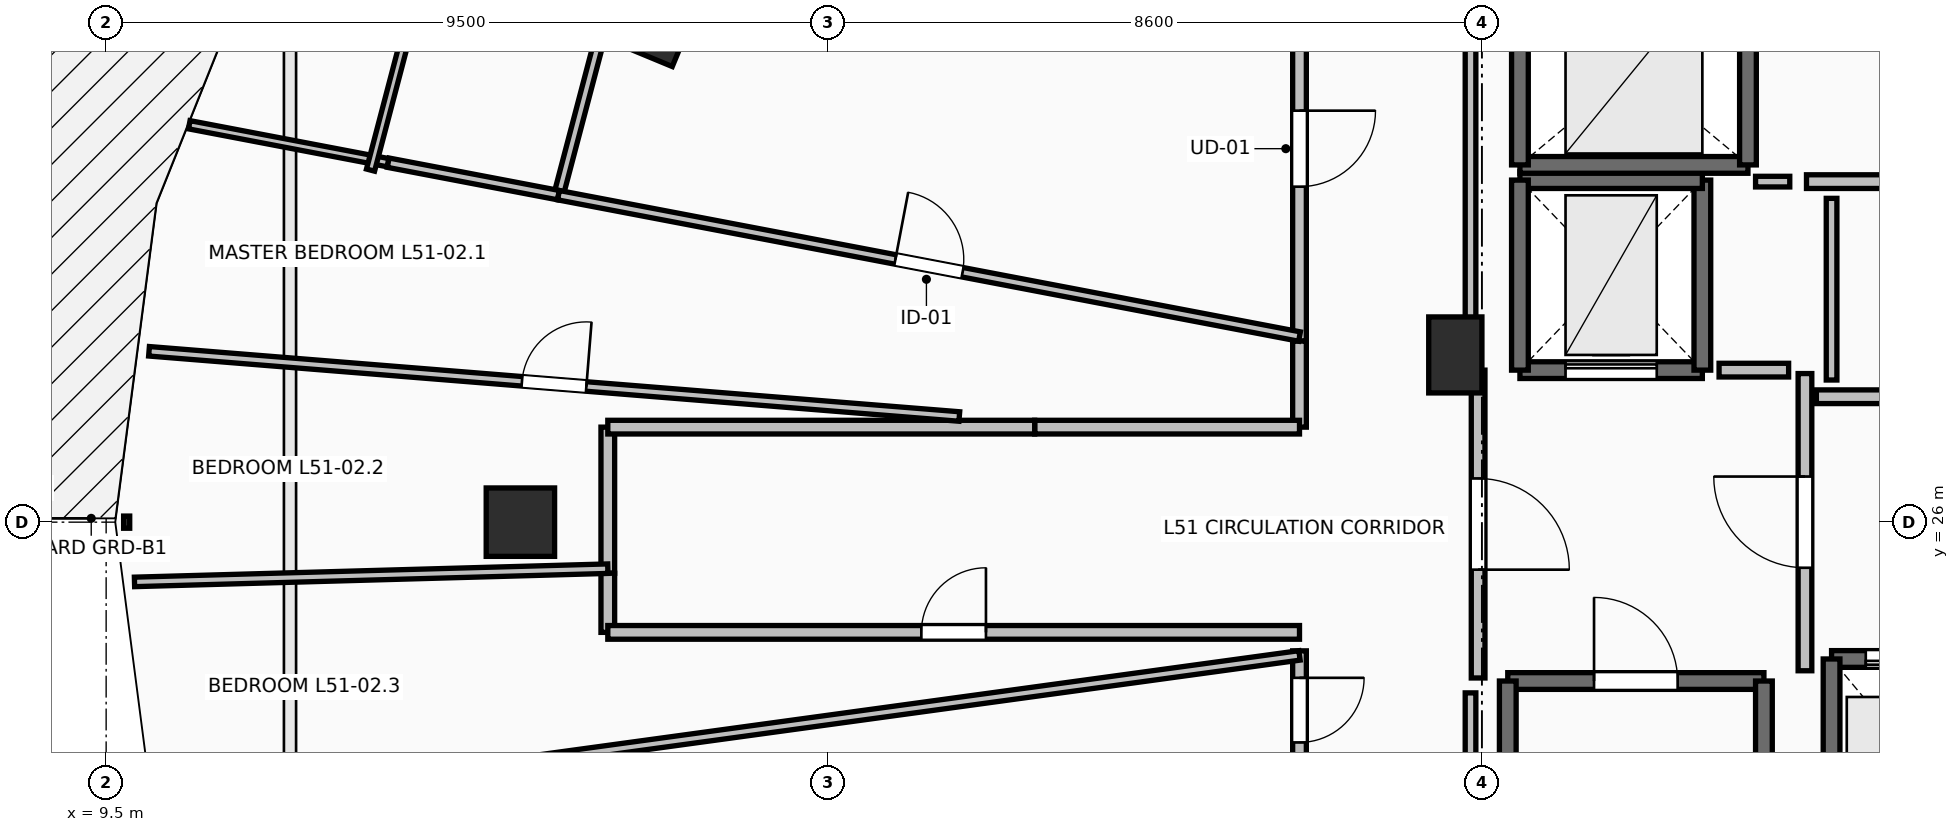
"""IFC4 building model, lengths in metres.
Left out: names, types, materials, properties, quantities, classifications, styles, units other than length and angle.
Written with IfcOpenShell. Run it as: python <this file> out.ifc"""

import sys

from ifc_helpers import new_model, si_unit, direction, frame, frame_2d, origin, origin_2d, place, context, subcontext, project, spatial, rectangle, extrude, element, fill, save


model = new_model("IFC4")
c1 = context("Model", 3, precision=1e-05, world=origin(), true_north=direction((0.0, 1.0)))
c2 = subcontext(c1, "Body", "Model", "MODEL_VIEW")
j1 = project(units=[si_unit("LENGTHUNIT", "METRE"), si_unit("PLANEANGLEUNIT", "RADIAN")], contexts=[c1])
p1 = place(None, origin())
s1 = spatial("IfcSite", under=j1, at=p1, CompositionType="ELEMENT")
p2 = place(p1, origin())
s2 = spatial("IfcBuilding", under=s1, at=p2, CompositionType="ELEMENT")
p3 = place(p2, frame((0.0, 0.0, 189.6)))
s3 = spatial("IfcBuildingStorey", under=s2, at=p3, CompositionType="ELEMENT", Elevation=189.6)
for number, where, z_axis, x_axis in (
    (1, (16.705, 32.582, 0.0), (0.0, 0.0, 1.0), (-0.924, 0.383, 0.0)),
    (2, (14.95, 26.0, 0.0), (0.0, 0.0, 1.0), (-1.0, 0.0, 0.0)),
):
    element("IfcColumn", number, at=place(p3, frame(where, z_axis=z_axis, x_axis=x_axis)), inside=s3, PredefinedType="COLUMN", context=c2, shape_type="SweptSolid", body=[
        extrude(rectangle(XDim=0.9, YDim=0.9, at=origin_2d()), origin(), (0.0, 0.0, 1.0), 3.5),
    ])
p4 = place(p3, frame((27.25, 28.2, 0.0), z_axis=(0.0, 0.0, 1.0), x_axis=(1.0, 0.0, 0.0)))
e3 = element("IfcColumn", 3, at=p4, inside=s3, PredefinedType="PILASTER", context=c2, shape_type="SweptSolid", body=[
    extrude(rectangle(XDim=0.7, YDim=1.0, at=origin_2d()), origin(), (0.0, 0.0, 1.0), 3.5),
])
p5 = place(p3, frame((27.94, 23.91, 0.0), z_axis=(0.0, 0.0, 1.0), x_axis=(1.0, 0.0, 0.0)))
e4 = element("IfcWall", 4, at=p5, inside=s3, PredefinedType="SOLIDWALL", context=c2, shape_type="SweptSolid", body=[
    extrude(rectangle(XDim=3.37, YDim=0.22, at=frame_2d((1.685, 0.0))), origin(), (0.0, 0.0, 1.0), 3.24),
])
p6 = place(p5, frame((1.135, 0.0, 0.0)))
e5 = element("IfcOpeningElement", 5, at=p6, cuts=e4, PredefinedType="OPENING", context=c2, shape_type="SweptSolid", body=[
    extrude(rectangle(XDim=1.1, YDim=2.15, at=frame_2d((0.55, 1.075))), frame((0.0, 0.125, 0.0), z_axis=(0.0, -1.0, 0.0), x_axis=(1.0, 0.0, 0.0)), (0.0, 0.0, 1.0), 0.25),
])
for number, where, z_axis, x_axis in (
    (6, (31.31, 23.91, 0.0), (0.0, 0.0, 1.0), (0.0, -1.0, 0.0)),
    (7, (27.94, 16.49, 0.0), (0.0, 0.0, 1.0), (0.0, 1.0, 0.0)),
):
    element("IfcWall", number, at=place(p3, frame(where, z_axis=z_axis, x_axis=x_axis)), inside=s3, PredefinedType="SOLIDWALL", context=c2, shape_type="SweptSolid", body=[
        extrude(rectangle(XDim=7.42, YDim=0.22, at=frame_2d((3.71, 0.0))), origin(), (0.0, 0.0, 1.0), 3.24),
    ])
p7 = place(p3, frame((34.2, 24.2, 0.0), z_axis=(0.0, 0.0, 1.0), x_axis=(-1.0, 0.0, 0.0)))
e8 = element("IfcWall", 8, at=p7, inside=s3, PredefinedType="SOLIDWALL", context=c2, shape_type="SweptSolid", body=[
    extrude(rectangle(XDim=2.0, YDim=0.22, at=frame_2d((1.0, 0.0))), origin(), (0.0, 0.0, 1.0), 3.24),
])
p8 = place(p7, frame((0.45, 0.0, 0.0)))
e9 = element("IfcOpeningElement", 9, at=p8, cuts=e8, PredefinedType="OPENING", context=c2, shape_type="SweptSolid", body=[
    extrude(rectangle(XDim=1.1, YDim=2.2, at=frame_2d((0.55, 1.1))), frame((0.0, 0.125, 0.0), z_axis=(0.0, -1.0, 0.0), x_axis=(1.0, 0.0, 0.0)), (0.0, 0.0, 1.0), 0.25),
])
p9 = place(p3, frame((32.2, 24.2, 0.0), z_axis=(0.0, 0.0, 1.0), x_axis=(0.0, -1.0, 0.0)))
e10 = element("IfcWall", 10, at=p9, inside=s3, PredefinedType="SOLIDWALL", context=c2, shape_type="SweptSolid", body=[
    extrude(rectangle(XDim=2.4, YDim=0.22, at=frame_2d((1.2, 0.0))), origin(), (0.0, 0.0, 1.0), 3.24),
])
p10 = place(p3, frame((28.1, 28.0, 0.0), z_axis=(0.0, 0.0, 1.0), x_axis=(1.0, 0.0, 0.0)))
e11 = element("IfcWall", 11, at=p10, inside=s3, PredefinedType="SHEAR", context=c2, shape_type="SweptSolid", body=[
    extrude(rectangle(XDim=2.4, YDim=0.22, at=frame_2d((1.2, 0.0))), origin(), (0.0, 0.0, 1.0), 3.24),
])
p11 = place(p10, frame((0.6, 0.0, 0.0)))
e12 = element("IfcOpeningElement", 12, at=p11, cuts=e11, PredefinedType="OPENING", context=c2, shape_type="SweptSolid", body=[
    extrude(rectangle(XDim=1.2, YDim=2.2, at=frame_2d((0.6, 1.1))), frame((0.0, 0.125, 0.0), z_axis=(0.0, -1.0, 0.0), x_axis=(1.0, 0.0, 0.0)), (0.0, 0.0, 1.0), 0.25),
])
p12 = place(p3, frame((30.5, 28.0, 0.0), z_axis=(0.0, 0.0, 1.0), x_axis=(0.0, 1.0, 0.0)))
e13 = element("IfcWall", 13, at=p12, inside=s3, PredefinedType="SHEAR", context=c2, shape_type="SweptSolid", body=[
    extrude(rectangle(XDim=2.5, YDim=0.22, at=frame_2d((1.25, 0.0))), origin(), (0.0, 0.0, 1.0), 3.24),
])
p13 = place(p3, frame((30.5, 30.5, 0.0), z_axis=(0.0, 0.0, 1.0), x_axis=(-1.0, 0.0, 0.0)))
e14 = element("IfcWall", 14, at=p13, inside=s3, PredefinedType="SHEAR", context=c2, shape_type="SweptSolid", body=[
    extrude(rectangle(XDim=2.4, YDim=0.22, at=frame_2d((1.2, 0.0))), origin(), (0.0, 0.0, 1.0), 3.24),
])
p14 = place(p3, frame((28.1, 30.5, 0.0), z_axis=(0.0, 0.0, 1.0), x_axis=(0.0, -1.0, 0.0)))
e15 = element("IfcWall", 15, at=p14, inside=s3, PredefinedType="SHEAR", context=c2, shape_type="SweptSolid", body=[
    extrude(rectangle(XDim=2.5, YDim=0.22, at=frame_2d((1.25, 0.0))), origin(), (0.0, 0.0, 1.0), 3.24),
])
p15 = place(p3, frame((28.1, 30.7, 0.0), z_axis=(0.0, 0.0, 1.0), x_axis=(1.0, 0.0, 0.0)))
e16 = element("IfcWall", 16, at=p15, inside=s3, PredefinedType="SOLIDWALL", context=c2, shape_type="SweptSolid", body=[
    extrude(rectangle(XDim=3.0, YDim=0.22, at=frame_2d((1.5, 0.0))), origin(), (0.0, 0.0, 1.0), 3.24),
])
for number, where, z_axis, x_axis in (
    (17, (31.1, 30.7, 0.0), (0.0, 0.0, 1.0), (0.0, 1.0, 0.0)),
    (18, (28.1, 33.2, 0.0), (0.0, 0.0, 1.0), (0.0, -1.0, 0.0)),
):
    element("IfcWall", number, at=place(p3, frame(where, z_axis=z_axis, x_axis=x_axis)), inside=s3, PredefinedType="SOLIDWALL", context=c2, shape_type="SweptSolid", body=[
        extrude(rectangle(XDim=2.5, YDim=0.22, at=frame_2d((1.25, 0.0))), origin(), (0.0, 0.0, 1.0), 3.24),
    ])
p16 = place(p3, frame((31.85, 24.045, 0.0), z_axis=(0.0, 0.0, 1.0), x_axis=(0.0, 1.0, 0.0)))
e19 = element("IfcWall", 19, at=p16, inside=s3, PredefinedType="PARTITIONING", context=c2, shape_type="SweptSolid", body=[
    extrude(rectangle(XDim=3.91, YDim=0.18, at=frame_2d((1.955, 0.0))), origin(), (0.0, 0.0, 1.0), 3.24),
])
p17 = place(p16, frame((1.355, 0.0, 0.0)))
e20 = element("IfcOpeningElement", 20, at=p17, cuts=e19, PredefinedType="OPENING", context=c2, shape_type="SweptSolid", body=[
    extrude(rectangle(XDim=1.2, YDim=2.15, at=frame_2d((0.6, 1.075))), frame((0.0, 0.105, 0.0), z_axis=(0.0, -1.0, 0.0), x_axis=(1.0, 0.0, 0.0)), (0.0, 0.0, 1.0), 0.21),
])
p18 = place(p3, frame((27.55, 28.0, 0.0), z_axis=(0.0, 0.0, 1.0), x_axis=(0.0, -1.0, 0.0)))
e21 = element("IfcWall", 21, at=p18, inside=s3, PredefinedType="PARTITIONING", context=c2, shape_type="SweptSolid", body=[
    extrude(rectangle(XDim=4.05, YDim=0.18, at=frame_2d((2.025, 0.0))), origin(), (0.0, 0.0, 1.0), 3.24),
])
p19 = place(p18, frame((1.425, 0.0, 0.0)))
e22 = element("IfcOpeningElement", 22, at=p19, cuts=e21, PredefinedType="OPENING", context=c2, shape_type="SweptSolid", body=[
    extrude(rectangle(XDim=1.2, YDim=2.15, at=frame_2d((0.6, 1.075))), frame((0.0, 0.105, 0.0), z_axis=(0.0, -1.0, 0.0), x_axis=(1.0, 0.0, 0.0)), (0.0, 0.0, 1.0), 0.21),
])
p20 = place(p3, frame((31.87, 30.48, 0.0), z_axis=(0.0, 0.0, 1.0), x_axis=(1.0, 0.0, 0.0)))
e23 = element("IfcWall", 23, at=p20, inside=s3, PredefinedType="PARTITIONING", context=c2, shape_type="SweptSolid", body=[
    extrude(rectangle(XDim=1.6, YDim=0.18, at=frame_2d((0.8, 0.0))), origin(), (0.0, 0.0, 1.0), 3.24),
])
p21 = place(p3, frame((35.04, 27.65, 0.0), z_axis=(0.0, 0.0, 1.0), x_axis=(-1.0, 0.0, 0.0)))
e24 = element("IfcWall", 24, at=p21, inside=s3, PredefinedType="PARTITIONING", context=c2, shape_type="SweptSolid", body=[
    extrude(rectangle(XDim=3.04, YDim=0.18, at=frame_2d((1.52, 0.0))), origin(), (0.0, 0.0, 1.0), 3.24),
])
p22 = place(p21, frame((1.02, 0.0, 0.0)))
e25 = element("IfcOpeningElement", 25, at=p22, cuts=e24, PredefinedType="OPENING", context=c2, shape_type="SweptSolid", body=[
    extrude(rectangle(XDim=1.0, YDim=2.15, at=frame_2d((0.5, 1.075))), frame((0.0, 0.105, 0.0), z_axis=(0.0, -1.0, 0.0), x_axis=(1.0, 0.0, 0.0)), (0.0, 0.0, 1.0), 0.21),
])
p23 = place(p3, frame((25.2, 33.445, 0.0), z_axis=(0.0, 0.0, 1.0), x_axis=(0.0, -1.0, 0.0)))
e26 = element("IfcWall", 26, at=p23, inside=s3, PredefinedType="PARTITIONING", context=c2, shape_type="SweptSolid", body=[
    extrude(rectangle(XDim=5.063, YDim=0.18, at=frame_2d((2.531, 0.0))), origin(), (0.0, 0.0, 1.0), 2.432),
])
p24 = place(p23, frame((2.031, 0.0, 0.0)))
e27 = element("IfcOpeningElement", 27, at=p24, cuts=e26, PredefinedType="OPENING", context=c2, shape_type="SweptSolid", body=[
    extrude(rectangle(XDim=1.0, YDim=2.15, at=frame_2d((0.5, 1.075))), frame((0.0, 0.105, 0.0), z_axis=(0.0, -1.0, 0.0), x_axis=(1.0, 0.0, 0.0)), (0.0, 0.0, 1.0), 0.21),
])
p25 = place(p3, frame((25.2, 28.382, 0.0), z_axis=(0.0, 0.0, 1.0), x_axis=(0.0, -1.0, 0.0)))
e28 = element("IfcWall", 28, at=p25, inside=s3, PredefinedType="PARTITIONING", context=c2, shape_type="SweptSolid", body=[
    extrude(rectangle(XDim=1.132, YDim=0.18, at=frame_2d((0.566, 0.0))), origin(), (0.0, 0.0, 1.0), 2.432),
])
p26 = place(p3, frame((25.2, 27.25, 0.0), z_axis=(0.0, 0.0, 1.0), x_axis=(-1.0, 0.0, 0.0)))
e29 = element("IfcWall", 29, at=p26, inside=s3, PredefinedType="PARTITIONING", context=c2, shape_type="SweptSolid", body=[
    extrude(rectangle(XDim=3.484, YDim=0.18, at=frame_2d((1.742, 0.0))), origin(), (0.0, 0.0, 1.0), 2.432),
])
p27 = place(p3, frame((16.1, 27.25, 0.0), z_axis=(0.0, 0.0, 1.0), x_axis=(0.0, -1.0, 0.0)))
e30 = element("IfcWall", 30, at=p27, inside=s3, PredefinedType="PARTITIONING", context=c2, shape_type="SweptSolid", body=[
    extrude(rectangle(XDim=1.922, YDim=0.18, at=frame_2d((0.961, 0.0))), origin(), (0.0, 0.0, 1.0), 2.432),
])
p28 = place(p3, frame((21.716, 27.25, 0.0), z_axis=(0.0, 0.0, 1.0), x_axis=(-1.0, 0.0, 0.0)))
e31 = element("IfcWall", 31, at=p28, inside=s3, PredefinedType="PARTITIONING", context=c2, shape_type="SweptSolid", body=[
    extrude(rectangle(XDim=5.616, YDim=0.18, at=frame_2d((2.808, 0.0))), origin(), (0.0, 0.0, 1.0), 2.432),
])
p29 = place(p3, frame((16.1, 25.328, 0.0), z_axis=(0.0, 0.0, 1.0), x_axis=(0.0, -1.0, 0.0)))
e32 = element("IfcWall", 32, at=p29, inside=s3, PredefinedType="PARTITIONING", context=c2, shape_type="SweptSolid", body=[
    extrude(rectangle(XDim=0.778, YDim=0.18, at=frame_2d((0.389, 0.0))), origin(), (0.0, 0.0, 1.0), 3.24),
])
p30 = place(p3, frame((16.1, 24.55, 0.0), z_axis=(0.0, 0.0, 1.0), x_axis=(1.0, 0.0, 0.0)))
e33 = element("IfcWall", 33, at=p30, inside=s3, PredefinedType="PARTITIONING", context=c2, shape_type="SweptSolid", body=[
    extrude(rectangle(XDim=9.1, YDim=0.18, at=frame_2d((4.55, 0.0))), origin(), (0.0, 0.0, 1.0), 2.922),
])
p31 = place(p30, frame((4.125, 0.0, 0.0)))
e34 = element("IfcOpeningElement", 34, at=p31, cuts=e33, PredefinedType="OPENING", context=c2, shape_type="SweptSolid", body=[
    extrude(rectangle(XDim=0.85, YDim=2.1, at=frame_2d((0.425, 1.05))), frame((0.0, 0.105, 0.0), z_axis=(0.0, -1.0, 0.0), x_axis=(1.0, 0.0, 0.0)), (0.0, 0.0, 1.0), 0.21),
])
p32 = place(p3, frame((25.2, 24.307, 0.0), z_axis=(0.0, 0.0, 1.0), x_axis=(0.0, -1.0, 0.0)))
e35 = element("IfcWall", 35, at=p32, inside=s3, PredefinedType="PARTITIONING", context=c2, shape_type="SweptSolid", body=[
    extrude(rectangle(XDim=1.56, YDim=0.18, at=frame_2d((0.78, 0.0))), origin(), (0.0, 0.0, 1.0), 3.24),
])
p33 = place(p32, frame((0.355, 0.0, 0.0)))
e36 = element("IfcOpeningElement", 36, at=p33, cuts=e35, PredefinedType="OPENING", context=c2, shape_type="SweptSolid", body=[
    extrude(rectangle(XDim=0.85, YDim=2.1, at=frame_2d((0.425, 1.05))), frame((0.0, 0.105, 0.0), z_axis=(0.0, -1.0, 0.0), x_axis=(1.0, 0.0, 0.0)), (0.0, 0.0, 1.0), 0.21),
])
p34 = place(p3, frame((13.21, 30.729, 0.0), z_axis=(0.0, 0.0, 1.0), x_axis=(-0.982266305937, 0.187491077708, 0.0)))
e37 = element("IfcWall", 37, at=p34, inside=s3, PredefinedType="PARTITIONING", context=c2, shape_type="SweptSolid", body=[
    extrude(rectangle(XDim=2.664, YDim=0.11, at=frame_2d((1.332, 0.0))), origin(), (0.0, 0.0, 1.0), 3.24),
])
p35 = place(p3, frame((16.123, 32.853, 0.0), z_axis=(0.0, 0.0, 1.0), x_axis=(-0.254775717765, -0.967000172512, 0.0)))
e38 = element("IfcWall", 38, at=p35, inside=s3, PredefinedType="PARTITIONING", context=c2, shape_type="SweptSolid", body=[
    extrude(rectangle(XDim=2.638, YDim=0.125, at=frame_2d((1.319, 0.0))), origin(), (0.0, 0.0, 1.0), 3.24),
])
p36 = place(p3, frame((15.451, 30.302, 0.0), z_axis=(0.0, 0.0, 1.0), x_axis=(-0.982295439063, 0.187338384738, 0.0)))
e39 = element("IfcWall", 39, at=p36, inside=s3, PredefinedType="PARTITIONING", context=c2, shape_type="SweptSolid", body=[
    extrude(rectangle(XDim=2.281, YDim=0.125, at=frame_2d((1.14, 0.0))), origin(), (0.0, 0.0, 1.0), 3.24),
])
p37 = place(p3, frame((15.451, 30.302, 0.0), z_axis=(0.0, 0.0, 1.0), x_axis=(0.982284698783, -0.187394691859, 0.0)))
e40 = element("IfcWall", 40, at=p37, inside=s3, PredefinedType="PARTITIONING", context=c2, shape_type="SweptSolid", body=[
    extrude(rectangle(XDim=9.925, YDim=0.125, at=frame_2d((4.962, 0.0))), origin(), (0.0, 0.0, 1.0), 2.774),
])
p38 = place(p37, frame((4.512, 0.0, 0.0)))
e41 = element("IfcOpeningElement", 41, at=p38, cuts=e40, PredefinedType="OPENING", context=c2, shape_type="SweptSolid", body=[
    extrude(rectangle(XDim=0.9, YDim=2.1, at=frame_2d((0.45, 1.05))), frame((0.0, 0.077, 0.0), z_axis=(0.0, -1.0, 0.0), x_axis=(1.0, 0.0, 0.0)), (0.0, 0.0, 1.0), 0.155),
])
p39 = place(p3, frame((12.979, 30.632, 0.0), z_axis=(0.0, 0.0, 1.0), x_axis=(0.254121849718, 0.967172210879, 0.0)))
e42 = element("IfcWall", 42, at=p39, inside=s3, PredefinedType="PARTITIONING", context=c2, shape_type="SweptSolid", body=[
    extrude(rectangle(XDim=3.203, YDim=0.11, at=frame_2d((1.602, 0.0))), origin(), (0.0, 0.0, 1.0), 3.24),
])
p40 = place(p3, frame((10.064, 28.248, 0.0), z_axis=(0.0, 0.0, 1.0), x_axis=(0.996775744362, -0.080237867939, 0.0)))
e43 = element("IfcWall", 43, at=p40, inside=s3, PredefinedType="PARTITIONING", context=c2, shape_type="SweptSolid", body=[
    extrude(rectangle(XDim=10.695, YDim=0.125, at=frame_2d((5.348, 0.0))), origin(), (0.0, 0.0, 1.0), 2.774),
])
p41 = place(p40, frame((4.923, 0.0, 0.0)))
e44 = element("IfcOpeningElement", 44, at=p41, cuts=e43, PredefinedType="OPENING", context=c2, shape_type="SweptSolid", body=[
    extrude(rectangle(XDim=0.85, YDim=2.1, at=frame_2d((0.425, 1.05))), frame((0.0, 0.077, 0.0), z_axis=(0.0, -1.0, 0.0), x_axis=(1.0, 0.0, 0.0)), (0.0, 0.0, 1.0), 0.155),
])
p42 = place(p3, frame((9.873, 25.214, 0.0), z_axis=(0.0, 0.0, 1.0), x_axis=(0.999610603939, 0.027904130401, 0.0)))
e45 = element("IfcWall", 45, at=p42, inside=s3, PredefinedType="PARTITIONING", context=c2, shape_type="SweptSolid", body=[
    extrude(rectangle(XDim=6.229, YDim=0.125, at=frame_2d((3.115, 0.0))), origin(), (0.0, 0.0, 1.0), 2.774),
])
p43 = place(p3, frame((10.266, 22.201, 0.0), z_axis=(0.0, 0.0, 1.0), x_axis=(0.990743725495, 0.135745609106, 0.0)))
e46 = element("IfcWall", 46, at=p43, inside=s3, PredefinedType="PARTITIONING", context=c2, shape_type="SweptSolid", body=[
    extrude(rectangle(XDim=15.073, YDim=0.125, at=frame_2d((7.537, 0.0))), origin(), (0.0, 0.0, 1.0), 2.774),
])
p44 = place(p3, frame((31.635, 28.0, 0.0), z_axis=(0.0, 0.0, 1.0), x_axis=(-1.0, 0.0, 0.0)))
e47 = element("IfcWall", 47, at=p44, inside=s3, PredefinedType="PARTITIONING", context=c2, shape_type="SweptSolid", body=[
    extrude(rectangle(XDim=0.915, YDim=0.18, at=frame_2d((0.458, 0.0))), origin(), (0.0, 0.0, 1.0), 3.24),
])
p45 = place(p3, frame((31.2, 30.48, 0.0), z_axis=(0.0, 0.0, 1.0), x_axis=(1.0, 0.0, 0.0)))
e48 = element("IfcWall", 48, at=p45, inside=s3, PredefinedType="PARTITIONING", context=c2, shape_type="SweptSolid", body=[
    extrude(rectangle(XDim=0.45, YDim=0.14, at=frame_2d((0.225, 0.0))), origin(), (0.0, 0.0, 1.0), 3.24),
])
p46 = place(p3, frame((32.2, 30.26, 0.0), z_axis=(0.0, 0.0, 1.0), x_axis=(0.0, -1.0, 0.0)))
e49 = element("IfcWall", 49, at=p46, inside=s3, PredefinedType="PARTITIONING", context=c2, shape_type="SweptSolid", body=[
    extrude(rectangle(XDim=2.39, YDim=0.14, at=frame_2d((1.195, 0.0))), origin(), (0.0, 0.0, 1.0), 3.24),
])
p47 = place(p3, frame((27.45, 33.45, 0.0), z_axis=(0.0, 0.0, 1.0), x_axis=(0.0, -1.0, 0.0)))
e50 = element("IfcWall", 50, at=p47, inside=s3, PredefinedType="PARTITIONING", context=c2, shape_type="SweptSolid", body=[
    extrude(rectangle(XDim=5.254, YDim=0.14, at=frame_2d((2.627, 0.0))), origin(), (0.0, 0.0, 1.0), 2.432),
])
p48 = place(p3, frame((27.45, 23.754, 0.0), z_axis=(0.0, 0.0, 1.0), x_axis=(0.0, -1.0, 0.0)))
e51 = element("IfcWall", 51, at=p48, inside=s3, PredefinedType="PARTITIONING", context=c2, shape_type="SweptSolid", body=[
    extrude(rectangle(XDim=7.514, YDim=0.14, at=frame_2d((3.757, 0.0))), origin(), (0.0, 0.0, 1.0), 2.432),
])
p49 = place(p6, origin())
e52 = element("IfcDoor", 52, at=p49, inside=s3, OperationType="SINGLE_SWING_LEFT", PredefinedType="DOOR", context=c2, shape_type="SweptSolid", body=[
    extrude(rectangle(XDim=1.1, YDim=2.15, at=frame_2d((0.55, 1.075))), frame((0.0, 0.025, 0.0), z_axis=(0.0, -1.0, 0.0), x_axis=(1.0, 0.0, 0.0)), (0.0, 0.0, 1.0), 0.05),
])
fill(e5, e52)
p50 = place(p8, origin())
e53 = element("IfcDoor", 53, at=p50, inside=s3, OperationType="SLIDING_TO_LEFT", PredefinedType="DOOR", context=c2, shape_type="SweptSolid", body=[
    extrude(rectangle(XDim=1.1, YDim=2.2, at=frame_2d((0.55, 1.1))), frame((0.0, 0.025, 0.0), z_axis=(0.0, -1.0, 0.0), x_axis=(1.0, 0.0, 0.0)), (0.0, 0.0, 1.0), 0.05),
])
fill(e9, e53)
p51 = place(p11, origin())
e54 = element("IfcDoor", 54, at=p51, inside=s3, OperationType="SLIDING_TO_LEFT", PredefinedType="DOOR", context=c2, shape_type="SweptSolid", body=[
    extrude(rectangle(XDim=1.2, YDim=2.2, at=frame_2d((0.6, 1.1))), frame((0.0, 0.025, 0.0), z_axis=(0.0, -1.0, 0.0), x_axis=(1.0, 0.0, 0.0)), (0.0, 0.0, 1.0), 0.05),
])
fill(e12, e54)
p52 = place(p17, origin())
e55 = element("IfcDoor", 55, at=p52, inside=s3, OperationType="SINGLE_SWING_RIGHT", PredefinedType="DOOR", context=c2, shape_type="SweptSolid", body=[
    extrude(rectangle(XDim=1.2, YDim=2.15, at=frame_2d((0.6, 1.075))), frame((0.0, 0.025, 0.0), z_axis=(0.0, -1.0, 0.0), x_axis=(1.0, 0.0, 0.0)), (0.0, 0.0, 1.0), 0.05),
])
fill(e20, e55)
p53 = place(p19, origin())
e56 = element("IfcDoor", 56, at=p53, inside=s3, OperationType="SINGLE_SWING_RIGHT", PredefinedType="DOOR", context=c2, shape_type="SweptSolid", body=[
    extrude(rectangle(XDim=1.2, YDim=2.15, at=frame_2d((0.6, 1.075))), frame((0.0, 0.025, 0.0), z_axis=(0.0, -1.0, 0.0), x_axis=(1.0, 0.0, 0.0)), (0.0, 0.0, 1.0), 0.05),
])
fill(e22, e56)
p54 = place(p24, origin())
e57 = element("IfcDoor", 57, at=p54, inside=s3, OperationType="SINGLE_SWING_LEFT", PredefinedType="DOOR", context=c2, shape_type="SweptSolid", body=[
    extrude(rectangle(XDim=1.0, YDim=2.15, at=frame_2d((0.5, 1.075))), frame((0.0, 0.025, 0.0), z_axis=(0.0, -1.0, 0.0), x_axis=(1.0, 0.0, 0.0)), (0.0, 0.0, 1.0), 0.05),
])
fill(e27, e57)
p55 = place(p38, origin())
e58 = element("IfcDoor", 58, at=p55, inside=s3, OperationType="SINGLE_SWING_LEFT", PredefinedType="DOOR", context=c2, shape_type="SweptSolid", body=[
    extrude(rectangle(XDim=0.9, YDim=2.1, at=frame_2d((0.45, 1.05))), frame((0.0, 0.025, 0.0), z_axis=(0.0, -1.0, 0.0), x_axis=(1.0, 0.0, 0.0)), (0.0, 0.0, 1.0), 0.05),
])
fill(e41, e58)
p56 = place(p31, origin())
e59 = element("IfcDoor", 59, at=p56, inside=s3, OperationType="SINGLE_SWING_RIGHT", PredefinedType="DOOR", context=c2, shape_type="SweptSolid", body=[
    extrude(rectangle(XDim=0.85, YDim=2.1, at=frame_2d((0.425, 1.05))), frame((0.0, 0.025, 0.0), z_axis=(0.0, -1.0, 0.0), x_axis=(1.0, 0.0, 0.0)), (0.0, 0.0, 1.0), 0.05),
])
fill(e34, e59)
p57 = place(p33, origin())
e60 = element("IfcDoor", 60, at=p57, inside=s3, OperationType="SINGLE_SWING_LEFT", PredefinedType="DOOR", context=c2, shape_type="SweptSolid", body=[
    extrude(rectangle(XDim=0.85, YDim=2.1, at=frame_2d((0.425, 1.05))), frame((0.0, 0.025, 0.0), z_axis=(0.0, -1.0, 0.0), x_axis=(1.0, 0.0, 0.0)), (0.0, 0.0, 1.0), 0.05),
])
fill(e36, e60)
p58 = place(p41, origin())
e61 = element("IfcDoor", 61, at=p58, inside=s3, OperationType="SINGLE_SWING_RIGHT", PredefinedType="DOOR", context=c2, shape_type="SweptSolid", body=[
    extrude(rectangle(XDim=0.85, YDim=2.1, at=frame_2d((0.425, 1.05))), frame((0.0, 0.025, 0.0), z_axis=(0.0, -1.0, 0.0), x_axis=(1.0, 0.0, 0.0)), (0.0, 0.0, 1.0), 0.05),
])
fill(e44, e61)
save(model, sys.argv[1])
